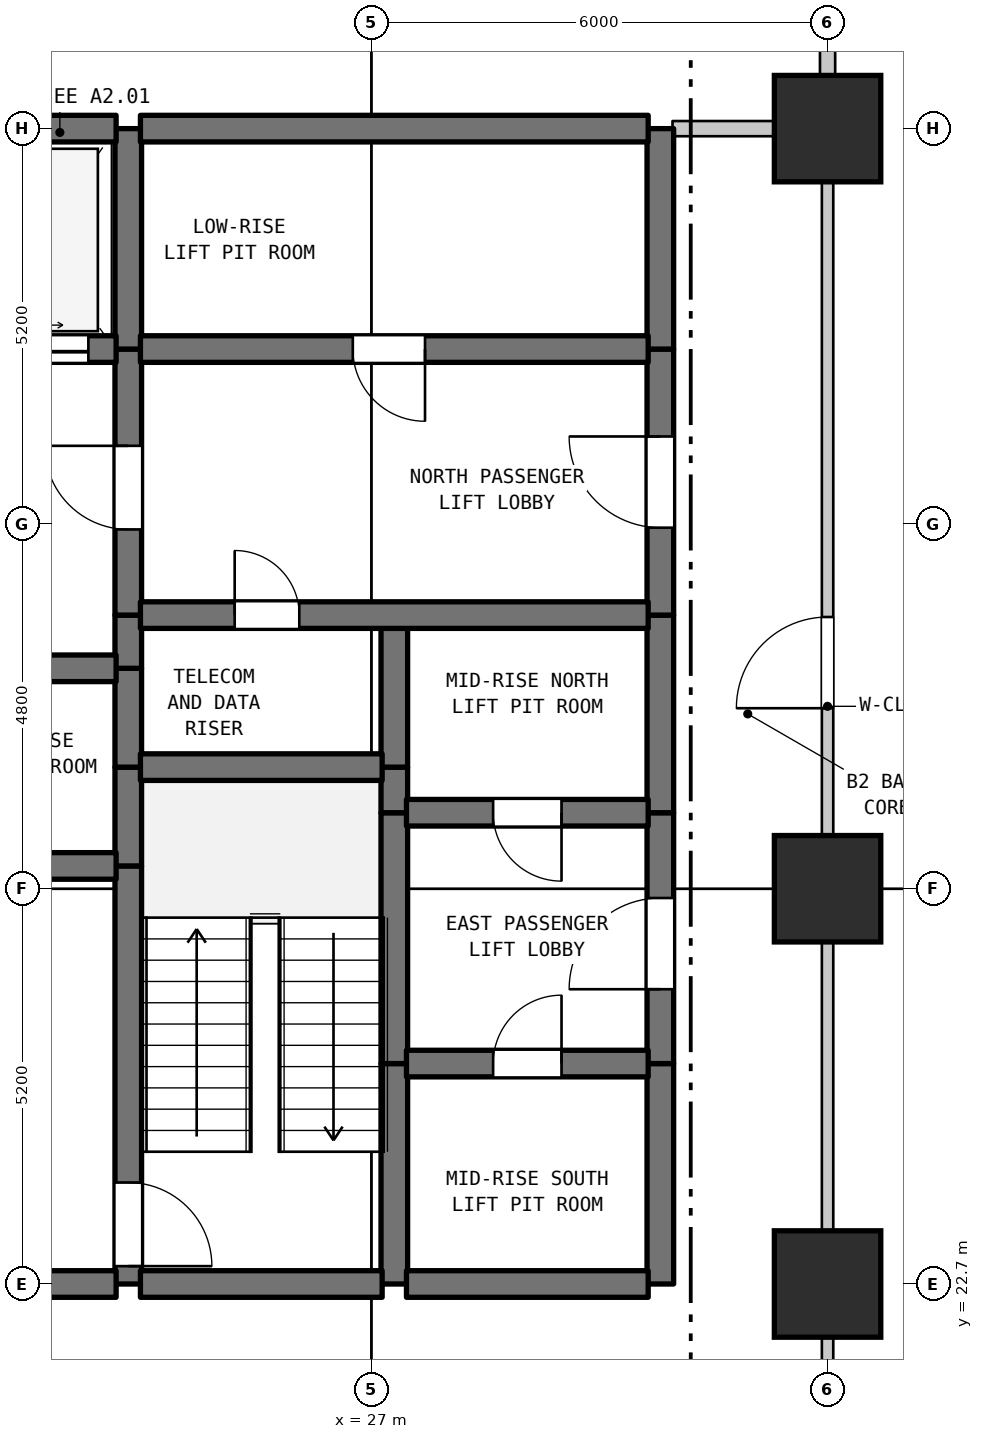
"""IFC4 building model, lengths in metres.
Left out: names, types, materials, properties, quantities, classifications, styles, units other than length and angle.
Written with IfcOpenShell. Run it as: python <this file> out.ifc"""

import sys

from ifc_helpers import new_model, si_unit, direction, frame, frame_2d, origin, origin_2d, place, context, subcontext, project, spatial, rectangle, extrude, element, fill, save


model = new_model("IFC4")
c1 = context("Model", 3, precision=1e-05, world=origin(), true_north=direction((0.0, 1.0)))
c2 = subcontext(c1, "Body", "Model", "MODEL_VIEW")
j1 = project(units=[si_unit("LENGTHUNIT", "METRE"), si_unit("PLANEANGLEUNIT", "RADIAN")], contexts=[c1])
p1 = place(None, origin())
s1 = spatial("IfcSite", under=j1, at=p1, CompositionType="ELEMENT")
p2 = place(p1, origin())
s2 = spatial("IfcBuilding", under=s1, at=p2, CompositionType="ELEMENT")
p3 = place(p2, frame((0.0, 0.0, -9.0)))
s3 = spatial("IfcBuildingStorey", under=s2, at=p3, CompositionType="ELEMENT", Elevation=-9.0)
for number, where, z_axis, x_axis in (
    (1, (33.0, 22.7, 0.0), (0.0, 0.0, 1.0), (1.0, 0.0, 0.0)),
    (2, (33.0, 27.9, 0.0), (0.0, 0.0, 1.0), (1.0, 0.0, 0.0)),
    (3, (33.0, 37.9, 0.0), (0.0, 0.0, 1.0), (1.0, 0.0, 0.0)),
):
    element("IfcColumn", number, at=place(p3, frame(where, z_axis=z_axis, x_axis=x_axis)), inside=s3, PredefinedType="PILASTER", context=c2, shape_type="SweptSolid", body=[
        extrude(rectangle(XDim=1.4, YDim=1.4, at=origin_2d()), origin(), (0.0, 0.0, 1.0), 4.5),
    ])
p4 = place(p3, frame((23.8, 22.7, 0.0), z_axis=(0.0, 0.0, 1.0), x_axis=(0.0, 1.0, 0.0)))
e4 = element("IfcWall", 4, at=p4, inside=s3, PredefinedType="SHEAR", context=c2, shape_type="SweptSolid", body=[
    extrude(rectangle(XDim=5.5, YDim=0.35, at=frame_2d((2.75, 0.0))), origin(), (0.0, 0.0, 1.0), 4.16),
])
p5 = place(p4, frame((0.235, 0.0, 0.0)))
e5 = element("IfcOpeningElement", 5, at=p5, cuts=e4, PredefinedType="OPENING", context=c2, shape_type="SweptSolid", body=[
    extrude(rectangle(XDim=1.1, YDim=2.15, at=frame_2d((0.55, 1.075))), frame((0.0, 0.185, 0.0), z_axis=(0.0, -1.0, 0.0), x_axis=(1.0, 0.0, 0.0)), (0.0, 0.0, 1.0), 0.37),
])
for number, where, z_axis, x_axis in (
    (6, (23.8, 28.2, 0.0), (0.0, 0.0, 1.0), (0.0, 1.0, 0.0)),
    (7, (23.8, 29.5, 0.0), (0.0, 0.0, 1.0), (0.0, 1.0, 0.0)),
):
    element("IfcWall", number, at=place(p3, frame(where, z_axis=z_axis, x_axis=x_axis)), inside=s3, PredefinedType="SHEAR", context=c2, shape_type="SweptSolid", body=[
        extrude(rectangle(XDim=1.3, YDim=0.35, at=frame_2d((0.65, 0.0))), origin(), (0.0, 0.0, 1.0), 4.16),
    ])
p6 = place(p3, frame((23.8, 30.8, 0.0), z_axis=(0.0, 0.0, 1.0), x_axis=(0.0, 1.0, 0.0)))
e8 = element("IfcWall", 8, at=p6, inside=s3, PredefinedType="SHEAR", context=c2, shape_type="SweptSolid", body=[
    extrude(rectangle(XDim=0.7, YDim=0.35, at=frame_2d((0.35, 0.0))), origin(), (0.0, 0.0, 1.0), 4.16),
])
p7 = place(p3, frame((23.8, 31.5, 0.0), z_axis=(0.0, 0.0, 1.0), x_axis=(0.0, 1.0, 0.0)))
e9 = element("IfcWall", 9, at=p7, inside=s3, PredefinedType="SHEAR", context=c2, shape_type="SweptSolid", body=[
    extrude(rectangle(XDim=3.5, YDim=0.35, at=frame_2d((1.75, 0.0))), origin(), (0.0, 0.0, 1.0), 4.16),
])
p8 = place(p7, frame((1.127, 0.0, 0.0)))
e10 = element("IfcOpeningElement", 10, at=p8, cuts=e9, PredefinedType="OPENING", context=c2, shape_type="SweptSolid", body=[
    extrude(rectangle(XDim=1.1, YDim=2.15, at=frame_2d((0.55, 1.075))), frame((0.0, 0.185, 0.0), z_axis=(0.0, -1.0, 0.0), x_axis=(1.0, 0.0, 0.0)), (0.0, 0.0, 1.0), 0.37),
])
p9 = place(p3, frame((23.8, 35.0, 0.0), z_axis=(0.0, 0.0, 1.0), x_axis=(0.0, 1.0, 0.0)))
e11 = element("IfcWall", 11, at=p9, inside=s3, PredefinedType="SHEAR", context=c2, shape_type="SweptSolid", body=[
    extrude(rectangle(XDim=2.9, YDim=0.35, at=frame_2d((1.45, 0.0))), origin(), (0.0, 0.0, 1.0), 4.16),
])
p10 = place(p3, frame((27.3, 22.7, 0.0), z_axis=(0.0, 0.0, 1.0), x_axis=(0.0, 1.0, 0.0)))
e12 = element("IfcWall", 12, at=p10, inside=s3, PredefinedType="SHEAR", context=c2, shape_type="SweptSolid", body=[
    extrude(rectangle(XDim=2.9, YDim=0.35, at=frame_2d((1.45, 0.0))), origin(), (0.0, 0.0, 1.0), 4.16),
])
p11 = place(p3, frame((27.3, 25.6, 0.0), z_axis=(0.0, 0.0, 1.0), x_axis=(0.0, 1.0, 0.0)))
e13 = element("IfcWall", 13, at=p11, inside=s3, PredefinedType="SHEAR", context=c2, shape_type="SweptSolid", body=[
    extrude(rectangle(XDim=3.3, YDim=0.35, at=frame_2d((1.65, 0.0))), origin(), (0.0, 0.0, 1.0), 4.16),
])
p12 = place(p3, frame((27.3, 28.9, 0.0), z_axis=(0.0, 0.0, 1.0), x_axis=(0.0, 1.0, 0.0)))
e14 = element("IfcWall", 14, at=p12, inside=s3, PredefinedType="SHEAR", context=c2, shape_type="SweptSolid", body=[
    extrude(rectangle(XDim=0.6, YDim=0.35, at=frame_2d((0.3, 0.0))), origin(), (0.0, 0.0, 1.0), 4.16),
])
p13 = place(p3, frame((27.3, 29.5, 0.0), z_axis=(0.0, 0.0, 1.0), x_axis=(0.0, 1.0, 0.0)))
e15 = element("IfcWall", 15, at=p13, inside=s3, PredefinedType="SHEAR", context=c2, shape_type="SweptSolid", body=[
    extrude(rectangle(XDim=2.0, YDim=0.35, at=frame_2d((1.0, 0.0))), origin(), (0.0, 0.0, 1.0), 4.16),
])
p14 = place(p3, frame((30.8, 22.7, 0.0), z_axis=(0.0, 0.0, 1.0), x_axis=(0.0, 1.0, 0.0)))
e16 = element("IfcWall", 16, at=p14, inside=s3, PredefinedType="SHEAR", context=c2, shape_type="SweptSolid", body=[
    extrude(rectangle(XDim=2.9, YDim=0.35, at=frame_2d((1.45, 0.0))), origin(), (0.0, 0.0, 1.0), 4.16),
])
p15 = place(p3, frame((30.8, 25.6, 0.0), z_axis=(0.0, 0.0, 1.0), x_axis=(0.0, 1.0, 0.0)))
e17 = element("IfcWall", 17, at=p15, inside=s3, PredefinedType="SHEAR", context=c2, shape_type="SweptSolid", body=[
    extrude(rectangle(XDim=3.3, YDim=0.35, at=frame_2d((1.65, 0.0))), origin(), (0.0, 0.0, 1.0), 4.16),
])
p16 = place(p15, frame((0.978, 0.0, 0.0)))
e18 = element("IfcOpeningElement", 18, at=p16, cuts=e17, PredefinedType="OPENING", context=c2, shape_type="SweptSolid", body=[
    extrude(rectangle(XDim=1.2, YDim=2.2, at=frame_2d((0.6, 1.1))), frame((0.0, 0.185, 0.0), z_axis=(0.0, -1.0, 0.0), x_axis=(1.0, 0.0, 0.0)), (0.0, 0.0, 1.0), 0.37),
])
p17 = place(p3, frame((30.8, 28.9, 0.0), z_axis=(0.0, 0.0, 1.0), x_axis=(0.0, 1.0, 0.0)))
e19 = element("IfcWall", 19, at=p17, inside=s3, PredefinedType="SHEAR", context=c2, shape_type="SweptSolid", body=[
    extrude(rectangle(XDim=2.6, YDim=0.35, at=frame_2d((1.3, 0.0))), origin(), (0.0, 0.0, 1.0), 4.16),
])
p18 = place(p3, frame((30.8, 31.5, 0.0), z_axis=(0.0, 0.0, 1.0), x_axis=(0.0, 1.0, 0.0)))
e20 = element("IfcWall", 20, at=p18, inside=s3, PredefinedType="SHEAR", context=c2, shape_type="SweptSolid", body=[
    extrude(rectangle(XDim=3.5, YDim=0.35, at=frame_2d((1.75, 0.0))), origin(), (0.0, 0.0, 1.0), 4.16),
])
p19 = place(p18, frame((1.15, 0.0, 0.0)))
e21 = element("IfcOpeningElement", 21, at=p19, cuts=e20, PredefinedType="OPENING", context=c2, shape_type="SweptSolid", body=[
    extrude(rectangle(XDim=1.2, YDim=2.2, at=frame_2d((0.6, 1.1))), frame((0.0, 0.185, 0.0), z_axis=(0.0, -1.0, 0.0), x_axis=(1.0, 0.0, 0.0)), (0.0, 0.0, 1.0), 0.37),
])
p20 = place(p3, frame((30.8, 35.0, 0.0), z_axis=(0.0, 0.0, 1.0), x_axis=(0.0, 1.0, 0.0)))
e22 = element("IfcWall", 22, at=p20, inside=s3, PredefinedType="SHEAR", context=c2, shape_type="SweptSolid", body=[
    extrude(rectangle(XDim=2.9, YDim=0.35, at=frame_2d((1.45, 0.0))), origin(), (0.0, 0.0, 1.0), 4.16),
])
p21 = place(p3, frame((33.0, 20.3, 0.0), z_axis=(0.0, 0.0, 1.0), x_axis=(0.0, 1.0, 0.0)))
e23 = element("IfcWall", 23, at=p21, inside=s3, PredefinedType="STANDARD", context=c2, shape_type="SweptSolid", body=[
    extrude(rectangle(XDim=2.4, YDim=0.15, at=frame_2d((1.2, 0.0))), origin(), (0.0, 0.0, 1.0), 3.61),
])
p22 = place(p3, frame((33.0, 37.9, 0.0), z_axis=(0.0, 0.0, 1.0), x_axis=(0.0, 1.0, 0.0)))
e24 = element("IfcWall", 24, at=p22, inside=s3, PredefinedType="STANDARD", context=c2, shape_type="SweptSolid", body=[
    extrude(rectangle(XDim=16.19, YDim=0.2, at=frame_2d((8.095, 0.0))), origin(), (0.0, 0.0, 1.0), 3.56),
])
p23 = place(p3, frame((19.16, 22.7, 0.0), z_axis=(0.0, 0.0, 1.0), x_axis=(1.0, 0.0, 0.0)))
e25 = element("IfcWall", 25, at=p23, inside=s3, PredefinedType="SHEAR", context=c2, shape_type="SweptSolid", body=[
    extrude(rectangle(XDim=4.48, YDim=0.35, at=frame_2d((2.24, 0.0))), origin(), (0.0, 0.0, 1.0), 4.16),
])
p24 = place(p23, frame((1.64, 0.0, 0.0)))
e26 = element("IfcOpeningElement", 26, at=p24, cuts=e25, PredefinedType="OPENING", context=c2, shape_type="SweptSolid", body=[
    extrude(rectangle(XDim=1.2, YDim=2.2, at=frame_2d((0.6, 1.1))), frame((0.0, 0.185, 0.0), z_axis=(0.0, -1.0, 0.0), x_axis=(1.0, 0.0, 0.0)), (0.0, 0.0, 1.0), 0.37),
])
for number, where, z_axis, x_axis in (
    (27, (23.96, 22.7, 0.0), (0.0, 0.0, 1.0), (1.0, 0.0, 0.0)),
    (28, (27.46, 22.7, 0.0), (0.0, 0.0, 1.0), (1.0, 0.0, 0.0)),
):
    element("IfcWall", number, at=place(p3, frame(where, z_axis=z_axis, x_axis=x_axis)), inside=s3, PredefinedType="SHEAR", context=c2, shape_type="SweptSolid", body=[
        extrude(rectangle(XDim=3.18, YDim=0.35, at=frame_2d((1.59, 0.0))), origin(), (0.0, 0.0, 1.0), 4.16),
    ])
p25 = place(p3, frame((27.46, 25.6, 0.0), z_axis=(0.0, 0.0, 1.0), x_axis=(1.0, 0.0, 0.0)))
e29 = element("IfcWall", 29, at=p25, inside=s3, PredefinedType="SHEAR", context=c2, shape_type="SweptSolid", body=[
    extrude(rectangle(XDim=3.18, YDim=0.35, at=frame_2d((1.59, 0.0))), origin(), (0.0, 0.0, 1.0), 4.16),
])
p26 = place(p25, frame((1.14, 0.0, 0.0)))
e30 = element("IfcOpeningElement", 30, at=p26, cuts=e29, PredefinedType="OPENING", context=c2, shape_type="SweptSolid", body=[
    extrude(rectangle(XDim=0.9, YDim=2.15, at=frame_2d((0.45, 1.075))), frame((0.0, 0.185, 0.0), z_axis=(0.0, -1.0, 0.0), x_axis=(1.0, 0.0, 0.0)), (0.0, 0.0, 1.0), 0.37),
])
p27 = place(p3, frame((19.16, 28.2, 0.0), z_axis=(0.0, 0.0, 1.0), x_axis=(1.0, 0.0, 0.0)))
e31 = element("IfcWall", 31, at=p27, inside=s3, PredefinedType="SHEAR", context=c2, shape_type="SweptSolid", body=[
    extrude(rectangle(XDim=4.48, YDim=0.35, at=frame_2d((2.24, 0.0))), origin(), (0.0, 0.0, 1.0), 4.16),
])
p28 = place(p27, frame((1.79, 0.0, 0.0)))
e32 = element("IfcOpeningElement", 32, at=p28, cuts=e31, PredefinedType="OPENING", context=c2, shape_type="SweptSolid", body=[
    extrude(rectangle(XDim=0.9, YDim=2.15, at=frame_2d((0.45, 1.075))), frame((0.0, 0.185, 0.0), z_axis=(0.0, -1.0, 0.0), x_axis=(1.0, 0.0, 0.0)), (0.0, 0.0, 1.0), 0.37),
])
p29 = place(p3, frame((27.46, 28.9, 0.0), z_axis=(0.0, 0.0, 1.0), x_axis=(1.0, 0.0, 0.0)))
e33 = element("IfcWall", 33, at=p29, inside=s3, PredefinedType="SHEAR", context=c2, shape_type="SweptSolid", body=[
    extrude(rectangle(XDim=3.18, YDim=0.35, at=frame_2d((1.59, 0.0))), origin(), (0.0, 0.0, 1.0), 4.16),
])
p30 = place(p29, frame((1.14, 0.0, 0.0)))
e34 = element("IfcOpeningElement", 34, at=p30, cuts=e33, PredefinedType="OPENING", context=c2, shape_type="SweptSolid", body=[
    extrude(rectangle(XDim=0.9, YDim=2.15, at=frame_2d((0.45, 1.075))), frame((0.0, 0.185, 0.0), z_axis=(0.0, -1.0, 0.0), x_axis=(1.0, 0.0, 0.0)), (0.0, 0.0, 1.0), 0.37),
])
p31 = place(p3, frame((23.96, 29.5, 0.0), z_axis=(0.0, 0.0, 1.0), x_axis=(1.0, 0.0, 0.0)))
e35 = element("IfcWall", 35, at=p31, inside=s3, PredefinedType="SHEAR", context=c2, shape_type="SweptSolid", body=[
    extrude(rectangle(XDim=3.18, YDim=0.35, at=frame_2d((1.59, 0.0))), origin(), (0.0, 0.0, 1.0), 4.16),
])
p32 = place(p3, frame((19.16, 30.8, 0.0), z_axis=(0.0, 0.0, 1.0), x_axis=(1.0, 0.0, 0.0)))
e36 = element("IfcWall", 36, at=p32, inside=s3, PredefinedType="SHEAR", context=c2, shape_type="SweptSolid", body=[
    extrude(rectangle(XDim=4.48, YDim=0.35, at=frame_2d((2.24, 0.0))), origin(), (0.0, 0.0, 1.0), 4.16),
])
p33 = place(p3, frame((23.96, 31.5, 0.0), z_axis=(0.0, 0.0, 1.0), x_axis=(1.0, 0.0, 0.0)))
e37 = element("IfcWall", 37, at=p33, inside=s3, PredefinedType="SHEAR", context=c2, shape_type="SweptSolid", body=[
    extrude(rectangle(XDim=6.68, YDim=0.35, at=frame_2d((3.34, 0.0))), origin(), (0.0, 0.0, 1.0), 4.16),
])
p34 = place(p33, frame((1.24, 0.0, 0.0)))
e38 = element("IfcOpeningElement", 38, at=p34, cuts=e37, PredefinedType="OPENING", context=c2, shape_type="SweptSolid", body=[
    extrude(rectangle(XDim=0.85, YDim=2.1, at=frame_2d((0.425, 1.05))), frame((0.0, 0.185, 0.0), z_axis=(0.0, -1.0, 0.0), x_axis=(1.0, 0.0, 0.0)), (0.0, 0.0, 1.0), 0.37),
])
p35 = place(p3, frame((19.16, 35.0, 0.0), z_axis=(0.0, 0.0, 1.0), x_axis=(1.0, 0.0, 0.0)))
e39 = element("IfcWall", 39, at=p35, inside=s3, PredefinedType="SHEAR", context=c2, shape_type="SweptSolid", body=[
    extrude(rectangle(XDim=4.48, YDim=0.35, at=frame_2d((2.24, 0.0))), origin(), (0.0, 0.0, 1.0), 4.16),
])
p36 = place(p35, frame((0.365, 0.0, 0.0)))
e40 = element("IfcOpeningElement", 40, at=p36, cuts=e39, PredefinedType="OPENING", context=c2, shape_type="SweptSolid", body=[
    extrude(rectangle(XDim=1.35, YDim=2.2, at=frame_2d((0.675, 1.1))), frame((0.0, 0.185, 0.0), z_axis=(0.0, -1.0, 0.0), x_axis=(1.0, 0.0, 0.0)), (0.0, 0.0, 1.0), 0.37),
])
p37 = place(p35, frame((2.765, 0.0, 0.0)))
e41 = element("IfcOpeningElement", 41, at=p37, cuts=e39, PredefinedType="OPENING", context=c2, shape_type="SweptSolid", body=[
    extrude(rectangle(XDim=1.35, YDim=2.2, at=frame_2d((0.675, 1.1))), frame((0.0, 0.185, 0.0), z_axis=(0.0, -1.0, 0.0), x_axis=(1.0, 0.0, 0.0)), (0.0, 0.0, 1.0), 0.37),
])
p38 = place(p3, frame((23.96, 35.0, 0.0), z_axis=(0.0, 0.0, 1.0), x_axis=(1.0, 0.0, 0.0)))
e42 = element("IfcWall", 42, at=p38, inside=s3, PredefinedType="SHEAR", context=c2, shape_type="SweptSolid", body=[
    extrude(rectangle(XDim=6.68, YDim=0.35, at=frame_2d((3.34, 0.0))), origin(), (0.0, 0.0, 1.0), 4.16),
])
p39 = place(p38, frame((2.794, 0.0, 0.0)))
e43 = element("IfcOpeningElement", 43, at=p39, cuts=e42, PredefinedType="OPENING", context=c2, shape_type="SweptSolid", body=[
    extrude(rectangle(XDim=0.95, YDim=2.15, at=frame_2d((0.475, 1.075))), frame((0.0, 0.185, 0.0), z_axis=(0.0, -1.0, 0.0), x_axis=(1.0, 0.0, 0.0)), (0.0, 0.0, 1.0), 0.37),
])
p40 = place(p3, frame((19.16, 37.9, 0.0), z_axis=(0.0, 0.0, 1.0), x_axis=(1.0, 0.0, 0.0)))
e44 = element("IfcWall", 44, at=p40, inside=s3, PredefinedType="SHEAR", context=c2, shape_type="SweptSolid", body=[
    extrude(rectangle(XDim=4.48, YDim=0.35, at=frame_2d((2.24, 0.0))), origin(), (0.0, 0.0, 1.0), 4.16),
])
p41 = place(p3, frame((23.96, 37.9, 0.0), z_axis=(0.0, 0.0, 1.0), x_axis=(1.0, 0.0, 0.0)))
e45 = element("IfcWall", 45, at=p41, inside=s3, PredefinedType="SHEAR", context=c2, shape_type="SweptSolid", body=[
    extrude(rectangle(XDim=6.68, YDim=0.35, at=frame_2d((3.34, 0.0))), origin(), (0.0, 0.0, 1.0), 4.16),
])
p42 = place(p3, frame((30.96, 37.9, 0.0), z_axis=(0.0, 0.0, 1.0), x_axis=(1.0, 0.0, 0.0)))
e46 = element("IfcWall", 46, at=p42, inside=s3, PredefinedType="STANDARD", context=c2, shape_type="SweptSolid", body=[
    extrude(rectangle(XDim=1.955, YDim=0.2, at=frame_2d((0.978, 0.0))), origin(), (0.0, 0.0, 1.0), 3.26),
])
p43 = place(p3, frame((33.0, 22.7, 0.0), z_axis=(0.0, 0.0, 1.0), x_axis=(0.0, 1.0, 0.0)))
e47 = element("IfcWall", 47, at=p43, inside=s3, PredefinedType="STANDARD", context=c2, shape_type="SweptSolid", body=[
    extrude(rectangle(XDim=15.2, YDim=0.15, at=frame_2d((7.6, 0.0))), origin(), (0.0, 0.0, 1.0), 3.56),
])
p44 = place(p43, frame((7.575, 0.0, 0.0)))
e48 = element("IfcOpeningElement", 48, at=p44, cuts=e47, PredefinedType="OPENING", context=c2, shape_type="SweptSolid", body=[
    extrude(rectangle(XDim=1.2, YDim=2.2, at=frame_2d((0.6, 1.1))), frame((0.0, 0.085, 0.0), z_axis=(0.0, -1.0, 0.0), x_axis=(1.0, 0.0, 0.0)), (0.0, 0.0, 1.0), 0.17),
])
p45 = place(p5, frame((1.1, 0.0, 0.0), z_axis=(0.0, 0.0, 1.0), x_axis=(-1.0, 0.0, 0.0)))
e49 = element("IfcDoor", 49, at=p45, inside=s3, OperationType="SINGLE_SWING_LEFT", PredefinedType="DOOR", context=c2, shape_type="SweptSolid", body=[
    extrude(rectangle(XDim=1.1, YDim=2.15, at=frame_2d((0.55, 1.075))), frame((0.0, 0.025, 0.0), z_axis=(0.0, -1.0, 0.0), x_axis=(1.0, 0.0, 0.0)), (0.0, 0.0, 1.0), 0.05),
])
fill(e5, e49)
p46 = place(p8, origin())
e50 = element("IfcDoor", 50, at=p46, inside=s3, OperationType="SINGLE_SWING_RIGHT", PredefinedType="DOOR", context=c2, shape_type="SweptSolid", body=[
    extrude(rectangle(XDim=1.1, YDim=2.15, at=frame_2d((0.55, 1.075))), frame((0.0, 0.025, 0.0), z_axis=(0.0, -1.0, 0.0), x_axis=(1.0, 0.0, 0.0)), (0.0, 0.0, 1.0), 0.05),
])
fill(e10, e50)
p47 = place(p16, origin())
e51 = element("IfcDoor", 51, at=p47, inside=s3, OperationType="SINGLE_SWING_LEFT", PredefinedType="DOOR", context=c2, shape_type="SweptSolid", body=[
    extrude(rectangle(XDim=1.2, YDim=2.2, at=frame_2d((0.6, 1.1))), frame((0.0, 0.025, 0.0), z_axis=(0.0, -1.0, 0.0), x_axis=(1.0, 0.0, 0.0)), (0.0, 0.0, 1.0), 0.05),
])
fill(e18, e51)
p48 = place(p19, origin())
e52 = element("IfcDoor", 52, at=p48, inside=s3, OperationType="SINGLE_SWING_RIGHT", PredefinedType="DOOR", context=c2, shape_type="SweptSolid", body=[
    extrude(rectangle(XDim=1.2, YDim=2.2, at=frame_2d((0.6, 1.1))), frame((0.0, 0.025, 0.0), z_axis=(0.0, -1.0, 0.0), x_axis=(1.0, 0.0, 0.0)), (0.0, 0.0, 1.0), 0.05),
])
fill(e21, e52)
p49 = place(p44, origin())
e53 = element("IfcDoor", 53, at=p49, inside=s3, OperationType="SINGLE_SWING_LEFT", PredefinedType="DOOR", context=c2, shape_type="SweptSolid", body=[
    extrude(rectangle(XDim=1.2, YDim=2.2, at=frame_2d((0.6, 1.1))), frame((0.0, 0.025, 0.0), z_axis=(0.0, -1.0, 0.0), x_axis=(1.0, 0.0, 0.0)), (0.0, 0.0, 1.0), 0.05),
])
fill(e48, e53)
p50 = place(p26, origin())
e54 = element("IfcDoor", 54, at=p50, inside=s3, OperationType="SINGLE_SWING_RIGHT", PredefinedType="DOOR", context=c2, shape_type="SweptSolid", body=[
    extrude(rectangle(XDim=0.9, YDim=2.15, at=frame_2d((0.45, 1.075))), frame((0.0, 0.025, 0.0), z_axis=(0.0, -1.0, 0.0), x_axis=(1.0, 0.0, 0.0)), (0.0, 0.0, 1.0), 0.05),
])
fill(e30, e54)
p51 = place(p30, frame((0.9, 0.0, 0.0), z_axis=(0.0, 0.0, 1.0), x_axis=(-1.0, 0.0, 0.0)))
e55 = element("IfcDoor", 55, at=p51, inside=s3, OperationType="SINGLE_SWING_RIGHT", PredefinedType="DOOR", context=c2, shape_type="SweptSolid", body=[
    extrude(rectangle(XDim=0.9, YDim=2.15, at=frame_2d((0.45, 1.075))), frame((0.0, 0.025, 0.0), z_axis=(0.0, -1.0, 0.0), x_axis=(1.0, 0.0, 0.0)), (0.0, 0.0, 1.0), 0.05),
])
fill(e34, e55)
p52 = place(p34, origin())
e56 = element("IfcDoor", 56, at=p52, inside=s3, OperationType="SINGLE_SWING_LEFT", PredefinedType="DOOR", context=c2, shape_type="SweptSolid", body=[
    extrude(rectangle(XDim=0.85, YDim=2.1, at=frame_2d((0.425, 1.05))), frame((0.0, 0.025, 0.0), z_axis=(0.0, -1.0, 0.0), x_axis=(1.0, 0.0, 0.0)), (0.0, 0.0, 1.0), 0.05),
])
fill(e38, e56)
p53 = place(p37, origin())
e57 = element("IfcDoor", 57, at=p53, inside=s3, OperationType="DOUBLE_DOOR_SLIDING", PredefinedType="DOOR", context=c2, shape_type="SweptSolid", body=[
    extrude(rectangle(XDim=1.35, YDim=2.2, at=frame_2d((0.675, 1.1))), frame((0.0, 0.025, 0.0), z_axis=(0.0, -1.0, 0.0), x_axis=(1.0, 0.0, 0.0)), (0.0, 0.0, 1.0), 0.05),
])
fill(e41, e57)
p54 = place(p39, frame((0.95, 0.0, 0.0), z_axis=(0.0, 0.0, 1.0), x_axis=(-1.0, 0.0, 0.0)))
e58 = element("IfcDoor", 58, at=p54, inside=s3, OperationType="SINGLE_SWING_RIGHT", PredefinedType="DOOR", context=c2, shape_type="SweptSolid", body=[
    extrude(rectangle(XDim=0.95, YDim=2.15, at=frame_2d((0.475, 1.075))), frame((0.0, 0.025, 0.0), z_axis=(0.0, -1.0, 0.0), x_axis=(1.0, 0.0, 0.0)), (0.0, 0.0, 1.0), 0.05),
])
fill(e43, e58)
save(model, sys.argv[1])
